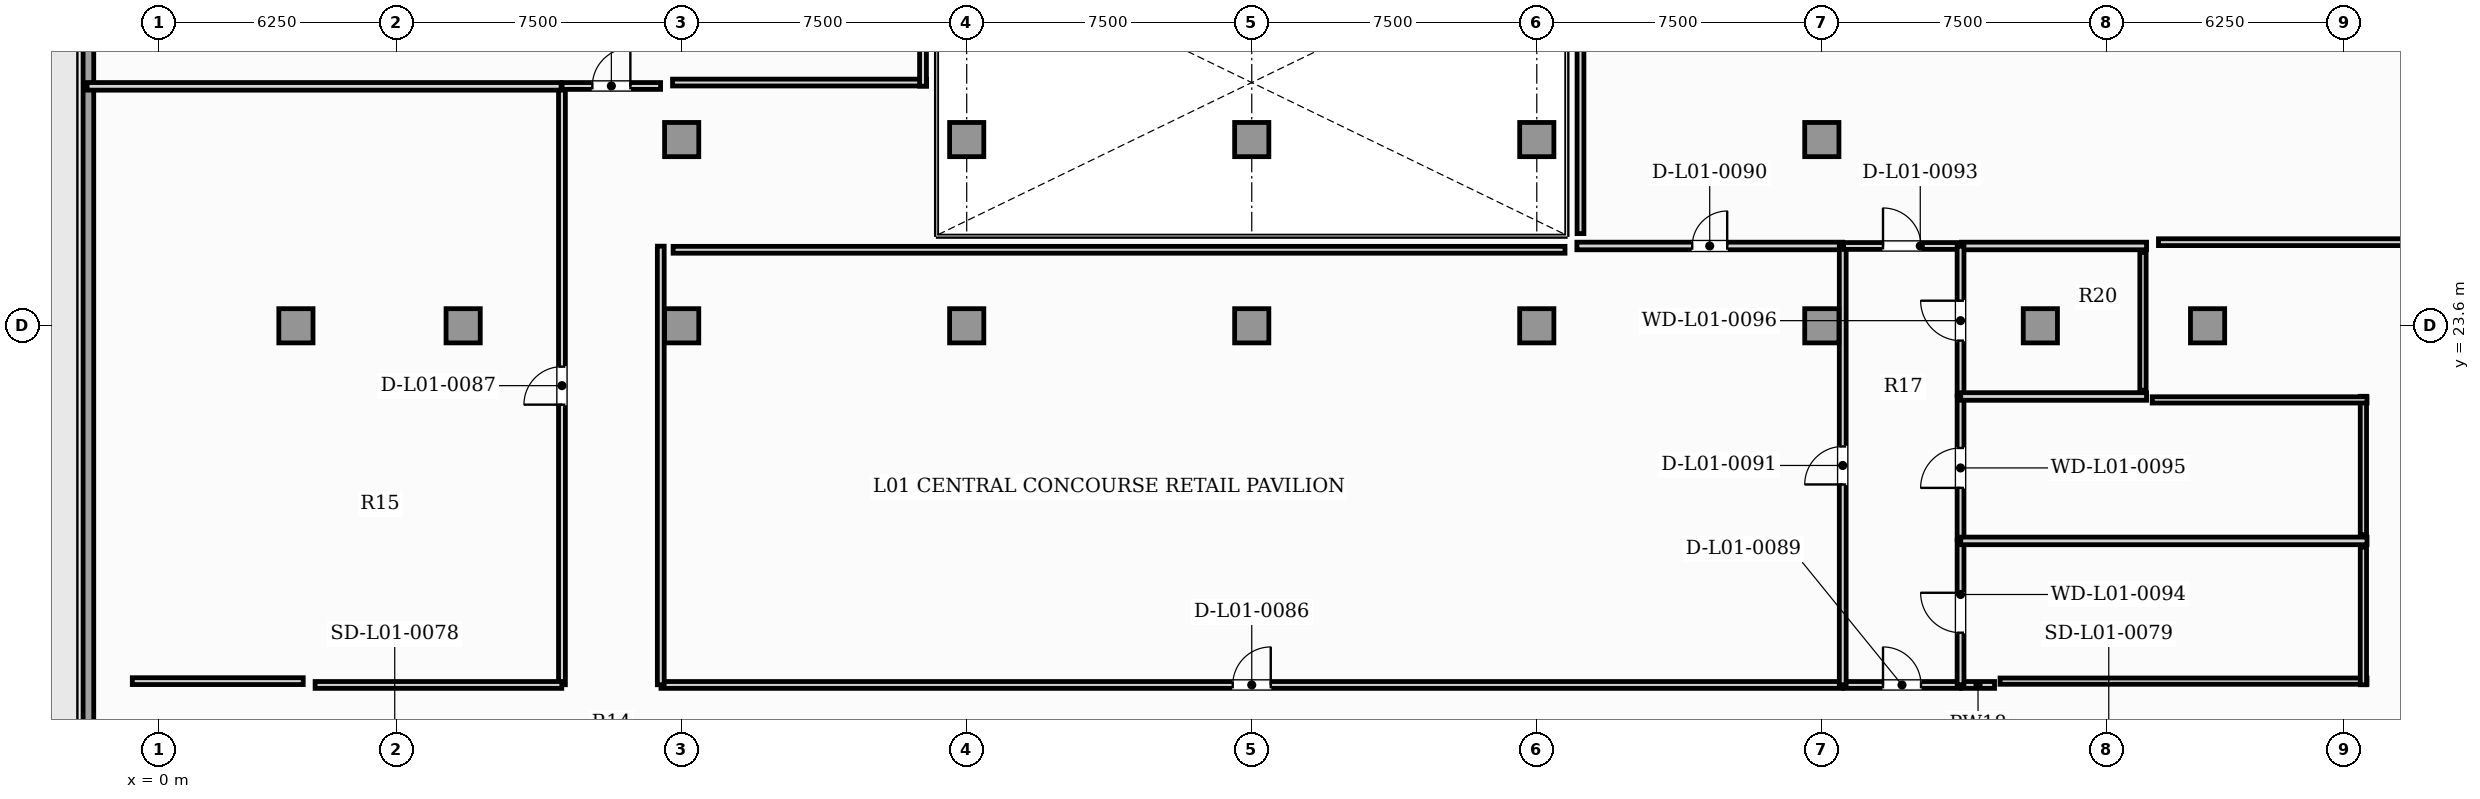
"""IFC4 building model, lengths in metres.
Left out: names, types, materials, properties, quantities, classifications, styles, units other than length and angle.
Written with IfcOpenShell. Run it as: python <this file> out.ifc"""

import sys

from ifc_helpers import new_model, si_unit, direction, frame, frame_2d, origin, origin_2d, place, context, subcontext, project, spatial, rectangle, extrude, element, fill, save


model = new_model("IFC4")
c1 = context("Model", 3, precision=1e-05, world=origin(), true_north=direction((0.0, 1.0)))
c2 = subcontext(c1, "Body", "Model", "MODEL_VIEW")
j1 = project(units=[si_unit("LENGTHUNIT", "METRE"), si_unit("PLANEANGLEUNIT", "RADIAN")], contexts=[c1])
p1 = place(None, origin())
s1 = spatial("IfcSite", under=j1, at=p1, CompositionType="ELEMENT")
p2 = place(p1, origin())
s2 = spatial("IfcBuilding", under=s1, at=p2, CompositionType="ELEMENT")
p3 = place(p2, frame((0.0, 0.0, 5.4)))
s3 = spatial("IfcBuildingStorey", under=s2, at=p3, CompositionType="ELEMENT", Elevation=5.4)
p4 = place(p3, frame((-1.86, 3.88, 0.0), z_axis=(0.0, 0.0, 1.0), x_axis=(0.0, 1.0, 0.0)))
e1 = element("IfcWall", 1, at=p4, inside=s3, PredefinedType="SHEAR", context=c2, shape_type="SweptSolid", body=[
    extrude(rectangle(XDim=34.27, YDim=0.28, at=frame_2d((17.135, 0.0))), origin(), (0.0, 0.0, 1.0), 4.5),
])
for number, where, z_axis, x_axis in (
    (2, (3.6, 23.6, 0.0), (0.0, 0.0, 1.0), (1.0, 0.0, 0.0)),
    (3, (13.75, 23.6, 0.0), (0.0, 0.0, 1.0), (1.0, 0.0, 0.0)),
    (4, (28.75, 23.6, 0.0), (0.0, 0.0, 1.0), (1.0, 0.0, 0.0)),
    (5, (43.75, 23.6, 0.0), (0.0, 0.0, 1.0), (1.0, 0.0, 0.0)),
    (6, (53.9, 23.6, 0.0), (0.0, 0.0, 1.0), (1.0, 0.0, 0.0)),
    (7, (8.0, 23.6, 0.0), (0.0, 0.0, 1.0), (1.0, 0.0, 0.0)),
    (8, (21.25, 23.6, 0.0), (0.0, 0.0, 1.0), (1.0, 0.0, 0.0)),
    (9, (36.25, 23.6, 0.0), (0.0, 0.0, 1.0), (1.0, 0.0, 0.0)),
    (10, (49.5, 23.6, 0.0), (0.0, 0.0, 1.0), (1.0, 0.0, 0.0)),
    (11, (13.75, 28.5, 0.0), (0.0, 0.0, 1.0), (1.0, 0.0, 0.0)),
    (12, (21.25, 28.5, 0.0), (0.0, 0.0, 1.0), (1.0, 0.0, 0.0)),
    (13, (28.75, 28.5, 0.0), (0.0, 0.0, 1.0), (1.0, 0.0, 0.0)),
    (14, (36.25, 28.5, 0.0), (0.0, 0.0, 1.0), (1.0, 0.0, 0.0)),
    (15, (43.75, 28.5, 0.0), (0.0, 0.0, 1.0), (1.0, 0.0, 0.0)),
):
    element("IfcColumn", number, at=place(p3, frame(where, z_axis=z_axis, x_axis=x_axis)), inside=s3, PredefinedType="COLUMN", context=c2, shape_type="SweptSolid", body=[
        extrude(rectangle(XDim=0.9, YDim=0.9, at=origin_2d()), origin(), (0.0, 0.0, 1.0), 4.8),
    ])
p5 = place(p3, frame((13.205, 14.15, 0.0), z_axis=(0.0, 0.0, 1.0), x_axis=(1.0, 0.0, 0.0)))
e16 = element("IfcWall", 16, at=p5, inside=s3, PredefinedType="PARTITIONING", context=c2, shape_type="SweptSolid", body=[
    extrude(rectangle(XDim=31.09, YDim=0.18, at=frame_2d((15.545, 0.0))), origin(), (0.0, 0.0, 1.0), 4.5),
])
p6 = place(p5, frame((15.045, 0.0, 0.0)))
e17 = element("IfcOpeningElement", 17, at=p6, cuts=e16, PredefinedType="OPENING", context=c2, shape_type="SweptSolid", body=[
    extrude(rectangle(XDim=1.0, YDim=2.15, at=frame_2d((0.5, 1.075))), frame((0.0, 0.1, 0.0), z_axis=(0.0, -1.0, 0.0), x_axis=(1.0, 0.0, 0.0)), (0.0, 0.0, 1.0), 0.2),
])
p7 = place(p3, frame((13.2, 14.155, 0.0), z_axis=(0.0, 0.0, 1.0), x_axis=(0.0, 1.0, 0.0)))
e18 = element("IfcWall", 18, at=p7, inside=s3, PredefinedType="PARTITIONING", context=c2, shape_type="SweptSolid", body=[
    extrude(rectangle(XDim=11.54, YDim=0.18, at=frame_2d((5.77, 0.0))), origin(), (0.0, 0.0, 1.0), 4.5),
])
p8 = place(p3, frame((10.6, 14.155, 0.0), z_axis=(0.0, 0.0, 1.0), x_axis=(0.0, 1.0, 0.0)))
e19 = element("IfcWall", 19, at=p8, inside=s3, PredefinedType="PARTITIONING", context=c2, shape_type="SweptSolid", body=[
    extrude(rectangle(XDim=15.74, YDim=0.18, at=frame_2d((7.87, 0.0))), origin(), (0.0, 0.0, 1.0), 4.5),
])
p9 = place(p8, frame((7.37, 0.0, 0.0)))
e20 = element("IfcOpeningElement", 20, at=p9, cuts=e19, PredefinedType="OPENING", context=c2, shape_type="SweptSolid", body=[
    extrude(rectangle(XDim=1.0, YDim=2.15, at=frame_2d((0.5, 1.075))), frame((0.0, 0.1, 0.0), z_axis=(0.0, -1.0, 0.0), x_axis=(1.0, 0.0, 0.0)), (0.0, 0.0, 1.0), 0.2),
])
p10 = place(p3, frame((4.105, 14.15, 0.0), z_axis=(0.0, 0.0, 1.0), x_axis=(1.0, 0.0, 0.0)))
e21 = element("IfcWall", 21, at=p10, inside=s3, PredefinedType="PARTITIONING", context=c2, shape_type="SweptSolid", body=[
    extrude(rectangle(XDim=6.49, YDim=0.18, at=frame_2d((3.245, 0.0))), origin(), (0.0, 0.0, 1.0), 4.5),
])
p11 = place(p3, frame((10.605, 29.91, 0.0), z_axis=(0.0, 0.0, 1.0), x_axis=(1.0, 0.0, 0.0)))
e22 = element("IfcWall", 22, at=p11, inside=s3, PredefinedType="PARTITIONING", context=c2, shape_type="SweptSolid", body=[
    extrude(rectangle(XDim=2.59, YDim=0.18, at=frame_2d((1.295, 0.0))), origin(), (0.0, 0.0, 1.0), 4.5),
])
p12 = place(p11, frame((0.795, 0.0, 0.0)))
e23 = element("IfcOpeningElement", 23, at=p12, cuts=e22, PredefinedType="OPENING", context=c2, shape_type="SweptSolid", body=[
    extrude(rectangle(XDim=1.0, YDim=2.15, at=frame_2d((0.5, 1.075))), frame((0.0, 0.1, 0.0), z_axis=(0.0, -1.0, 0.0), x_axis=(1.0, 0.0, 0.0)), (0.0, 0.0, 1.0), 0.2),
])
p13 = place(p3, frame((44.325, 14.15, 0.0), z_axis=(0.0, 0.0, 1.0), x_axis=(1.0, 0.0, 0.0)))
e24 = element("IfcWall", 24, at=p13, inside=s3, PredefinedType="PARTITIONING", context=c2, shape_type="SweptSolid", body=[
    extrude(rectangle(XDim=3.07, YDim=0.18, at=frame_2d((1.535, 0.0))), origin(), (0.0, 0.0, 1.0), 4.5),
])
p14 = place(p13, frame((1.035, 0.0, 0.0)))
e25 = element("IfcOpeningElement", 25, at=p14, cuts=e24, PredefinedType="OPENING", context=c2, shape_type="SweptSolid", body=[
    extrude(rectangle(XDim=1.0, YDim=2.15, at=frame_2d((0.5, 1.075))), frame((0.0, 0.1, 0.0), z_axis=(0.0, -1.0, 0.0), x_axis=(1.0, 0.0, 0.0)), (0.0, 0.0, 1.0), 0.2),
])
p15 = place(p3, frame((47.425, 14.15, 0.0), z_axis=(0.0, 0.0, 1.0), x_axis=(1.0, 0.0, 0.0)))
e26 = element("IfcWall", 26, at=p15, inside=s3, PredefinedType="PARTITIONING", context=c2, shape_type="SweptSolid", body=[
    extrude(rectangle(XDim=0.87, YDim=0.18, at=frame_2d((0.435, 0.0))), origin(), (0.0, 0.0, 1.0), 4.5),
])
p16 = place(p3, frame((37.305, 25.7, 0.0), z_axis=(0.0, 0.0, 1.0), x_axis=(1.0, 0.0, 0.0)))
e27 = element("IfcWall", 27, at=p16, inside=s3, PredefinedType="PARTITIONING", context=c2, shape_type="SweptSolid", body=[
    extrude(rectangle(XDim=6.99, YDim=0.2, at=frame_2d((3.495, 0.0))), origin(), (0.0, 0.0, 1.0), 4.5),
])
p17 = place(p16, frame((3.035, 0.0, 0.0)))
e28 = element("IfcOpeningElement", 28, at=p17, cuts=e27, PredefinedType="OPENING", context=c2, shape_type="SweptSolid", body=[
    extrude(rectangle(XDim=0.92, YDim=2.1, at=frame_2d((0.46, 1.05))), frame((0.0, 0.11, 0.0), z_axis=(0.0, -1.0, 0.0), x_axis=(1.0, 0.0, 0.0)), (0.0, 0.0, 1.0), 0.22),
])
p18 = place(p3, frame((44.3, 14.155, 0.0), z_axis=(0.0, 0.0, 1.0), x_axis=(0.0, 1.0, 0.0)))
e29 = element("IfcWall", 29, at=p18, inside=s3, PredefinedType="PARTITIONING", context=c2, shape_type="SweptSolid", body=[
    extrude(rectangle(XDim=11.54, YDim=0.18, at=frame_2d((5.77, 0.0))), origin(), (0.0, 0.0, 1.0), 4.5),
])
p19 = place(p18, frame((5.27, 0.0, 0.0)))
e30 = element("IfcOpeningElement", 30, at=p19, cuts=e29, PredefinedType="OPENING", context=c2, shape_type="SweptSolid", body=[
    extrude(rectangle(XDim=1.0, YDim=2.15, at=frame_2d((0.5, 1.075))), frame((0.0, 0.1, 0.0), z_axis=(0.0, -1.0, 0.0), x_axis=(1.0, 0.0, 0.0)), (0.0, 0.0, 1.0), 0.2),
])
p20 = place(p3, frame((-1.895, 29.9, 0.0), z_axis=(0.0, 0.0, 1.0), x_axis=(1.0, 0.0, 0.0)))
e31 = element("IfcWall", 31, at=p20, inside=s3, PredefinedType="PARTITIONING", context=c2, shape_type="SweptSolid", body=[
    extrude(rectangle(XDim=12.472, YDim=0.2, at=frame_2d((6.236, 0.0))), origin(), (0.0, 0.0, 1.0), 4.5),
])
p21 = place(p3, frame((44.325, 25.7, 0.0), z_axis=(0.0, 0.0, 1.0), x_axis=(1.0, 0.0, 0.0)))
e32 = element("IfcWall", 32, at=p21, inside=s3, PredefinedType="PARTITIONING", context=c2, shape_type="SweptSolid", body=[
    extrude(rectangle(XDim=3.07, YDim=0.18, at=frame_2d((1.535, 0.0))), origin(), (0.0, 0.0, 1.0), 4.5),
])
p22 = place(p21, frame((1.035, 0.0, 0.0)))
e33 = element("IfcOpeningElement", 33, at=p22, cuts=e32, PredefinedType="OPENING", context=c2, shape_type="SweptSolid", body=[
    extrude(rectangle(XDim=1.0, YDim=2.15, at=frame_2d((0.5, 1.075))), frame((0.0, 0.1, 0.0), z_axis=(0.0, -1.0, 0.0), x_axis=(1.0, 0.0, 0.0)), (0.0, 0.0, 1.0), 0.2),
])
p23 = place(p3, frame((47.425, 25.7, 0.0), z_axis=(0.0, 0.0, 1.0), x_axis=(1.0, 0.0, 0.0)))
e34 = element("IfcWall", 34, at=p23, inside=s3, PredefinedType="PARTITIONING", context=c2, shape_type="SweptSolid", body=[
    extrude(rectangle(XDim=4.87, YDim=0.2, at=frame_2d((2.435, 0.0))), origin(), (0.0, 0.0, 1.0), 4.5),
])
p24 = place(p3, frame((47.4, 14.155, 0.0), z_axis=(0.0, 0.0, 1.0), x_axis=(0.0, 1.0, 0.0)))
e35 = element("IfcWall", 35, at=p24, inside=s3, PredefinedType="PARTITIONING", context=c2, shape_type="SweptSolid", body=[
    extrude(rectangle(XDim=3.79, YDim=0.18, at=frame_2d((1.895, 0.0))), origin(), (0.0, 0.0, 1.0), 4.5),
])
p25 = place(p24, frame((1.37, 0.0, 0.0)))
e36 = element("IfcOpeningElement", 36, at=p25, cuts=e35, PredefinedType="OPENING", context=c2, shape_type="SweptSolid", body=[
    extrude(rectangle(XDim=1.05, YDim=2.15, at=frame_2d((0.525, 1.075))), frame((0.0, 0.1, 0.0), z_axis=(0.0, -1.0, 0.0), x_axis=(1.0, 0.0, 0.0)), (0.0, 0.0, 1.0), 0.2),
])
p26 = place(p3, frame((47.4, 17.975, 0.0), z_axis=(0.0, 0.0, 1.0), x_axis=(0.0, 1.0, 0.0)))
e37 = element("IfcWall", 37, at=p26, inside=s3, PredefinedType="PARTITIONING", context=c2, shape_type="SweptSolid", body=[
    extrude(rectangle(XDim=3.77, YDim=0.18, at=frame_2d((1.885, 0.0))), origin(), (0.0, 0.0, 1.0), 4.5),
])
p27 = place(p26, frame((1.36, 0.0, 0.0)))
e38 = element("IfcOpeningElement", 38, at=p27, cuts=e37, PredefinedType="OPENING", context=c2, shape_type="SweptSolid", body=[
    extrude(rectangle(XDim=1.05, YDim=2.15, at=frame_2d((0.525, 1.075))), frame((0.0, 0.1, 0.0), z_axis=(0.0, -1.0, 0.0), x_axis=(1.0, 0.0, 0.0)), (0.0, 0.0, 1.0), 0.2),
])
p28 = place(p3, frame((47.4, 21.775, 0.0), z_axis=(0.0, 0.0, 1.0), x_axis=(0.0, 1.0, 0.0)))
e39 = element("IfcWall", 39, at=p28, inside=s3, PredefinedType="PARTITIONING", context=c2, shape_type="SweptSolid", body=[
    extrude(rectangle(XDim=3.92, YDim=0.18, at=frame_2d((1.96, 0.0))), origin(), (0.0, 0.0, 1.0), 4.5),
])
p29 = place(p28, frame((1.435, 0.0, 0.0)))
e40 = element("IfcOpeningElement", 40, at=p29, cuts=e39, PredefinedType="OPENING", context=c2, shape_type="SweptSolid", body=[
    extrude(rectangle(XDim=1.05, YDim=2.15, at=frame_2d((0.525, 1.075))), frame((0.0, 0.1, 0.0), z_axis=(0.0, -1.0, 0.0), x_axis=(1.0, 0.0, 0.0)), (0.0, 0.0, 1.0), 0.2),
])
p30 = place(p3, frame((47.405, 17.94, 0.0), z_axis=(0.0, 0.0, 1.0), x_axis=(1.0, 0.0, 0.0)))
e41 = element("IfcWall", 41, at=p30, inside=s3, PredefinedType="PARTITIONING", context=c2, shape_type="SweptSolid", body=[
    extrude(rectangle(XDim=10.69, YDim=0.2, at=frame_2d((5.345, 0.0))), origin(), (0.0, 0.0, 1.0), 4.5),
])
p31 = place(p3, frame((47.405, 21.74, 0.0), z_axis=(0.0, 0.0, 1.0), x_axis=(1.0, 0.0, 0.0)))
e42 = element("IfcWall", 42, at=p31, inside=s3, PredefinedType="PARTITIONING", context=c2, shape_type="SweptSolid", body=[
    extrude(rectangle(XDim=4.89, YDim=0.2, at=frame_2d((2.445, 0.0))), origin(), (0.0, 0.0, 1.0), 4.5),
])
p32 = place(p3, frame((36.993, 25.6, 0.0), z_axis=(0.0, 0.0, 1.0), x_axis=(-1.0, 0.0, 0.0)))
e43 = element("IfcWall", 43, at=p32, inside=s3, PredefinedType="PARTITIONING", context=c2, shape_type="SweptSolid", body=[
    extrude(rectangle(XDim=23.468, YDim=0.18, at=frame_2d((11.734, 0.0))), origin(), (0.0, 0.0, 1.0), 4.5),
])
p33 = place(p3, frame((-0.705, 14.25, 0.0), z_axis=(0.0, 0.0, 1.0), x_axis=(1.0, 0.0, 0.0)))
e44 = element("IfcWall", 44, at=p33, inside=s3, PredefinedType="PARTITIONING", context=c2, shape_type="SweptSolid", body=[
    extrude(rectangle(XDim=4.498, YDim=0.18, at=frame_2d((2.249, 0.0))), origin(), (0.0, 0.0, 1.0), 4.5),
])
p34 = place(p3, frame((13.51, 30.0, 0.0), z_axis=(0.0, 0.0, 1.0), x_axis=(1.0, 0.0, 0.0)))
e45 = element("IfcWall", 45, at=p34, inside=s3, PredefinedType="PARTITIONING", context=c2, shape_type="SweptSolid", body=[
    extrude(rectangle(XDim=6.685, YDim=0.18, at=frame_2d((3.343, 0.0))), origin(), (0.0, 0.0, 1.0), 4.5),
])
p35 = place(p3, frame((20.1, 29.905, 0.0), z_axis=(0.0, 0.0, 1.0), x_axis=(0.0, 1.0, 0.0)))
e46 = element("IfcWall", 46, at=p35, inside=s3, PredefinedType="PARTITIONING", context=c2, shape_type="SweptSolid", body=[
    extrude(rectangle(XDim=4.088, YDim=0.18, at=frame_2d((2.044, 0.0))), origin(), (0.0, 0.0, 1.0), 4.5),
])
p36 = place(p3, frame((52.607, 25.8, 0.0), z_axis=(0.0, 0.0, 1.0), x_axis=(1.0, 0.0, 0.0)))
e47 = element("IfcWall", 47, at=p36, inside=s3, PredefinedType="PARTITIONING", context=c2, shape_type="SweptSolid", body=[
    extrude(rectangle(XDim=9.988, YDim=0.18, at=frame_2d((4.994, 0.0))), origin(), (0.0, 0.0, 1.0), 4.5),
])
p37 = place(p3, frame((37.4, 33.993, 0.0), z_axis=(0.0, 0.0, 1.0), x_axis=(0.0, -1.0, 0.0)))
e48 = element("IfcWall", 48, at=p37, inside=s3, PredefinedType="PARTITIONING", context=c2, shape_type="SweptSolid", body=[
    extrude(rectangle(XDim=7.968, YDim=0.18, at=frame_2d((3.984, 0.0))), origin(), (0.0, 0.0, 1.0), 4.5),
])
p38 = place(p3, frame((48.44, 14.25, 0.0), z_axis=(0.0, 0.0, 1.0), x_axis=(1.0, 0.0, 0.0)))
e49 = element("IfcWall", 49, at=p38, inside=s3, PredefinedType="PLUMBINGWALL", context=c2, shape_type="SweptSolid", body=[
    extrude(rectangle(XDim=9.655, YDim=0.165, at=frame_2d((4.828, 0.0))), origin(), (0.0, 0.0, 1.0), 4.5),
])
p39 = place(p3, frame((58.0, 14.155, 0.0), z_axis=(0.0, 0.0, 1.0), x_axis=(0.0, 1.0, 0.0)))
e50 = element("IfcWall", 50, at=p39, inside=s3, PredefinedType="PLUMBINGWALL", context=c2, shape_type="SweptSolid", body=[
    extrude(rectangle(XDim=3.62, YDim=0.165, at=frame_2d((1.81, 0.0))), origin(), (0.0, 0.0, 1.0), 4.5),
])
p40 = place(p3, frame((58.0, 18.105, 0.0), z_axis=(0.0, 0.0, 1.0), x_axis=(0.0, 1.0, 0.0)))
e51 = element("IfcWall", 51, at=p40, inside=s3, PredefinedType="PLUMBINGWALL", context=c2, shape_type="SweptSolid", body=[
    extrude(rectangle(XDim=3.64, YDim=0.165, at=frame_2d((1.82, 0.0))), origin(), (0.0, 0.0, 1.0), 4.5),
])
p41 = place(p3, frame((58.095, 21.65, 0.0), z_axis=(0.0, 0.0, 1.0), x_axis=(-1.0, 0.0, 0.0)))
e52 = element("IfcWall", 52, at=p41, inside=s3, PredefinedType="PLUMBINGWALL", context=c2, shape_type="SweptSolid", body=[
    extrude(rectangle(XDim=5.651, YDim=0.165, at=frame_2d((2.826, 0.0))), origin(), (0.0, 0.0, 1.0), 4.5),
])
p42 = place(p3, frame((52.2, 21.905, 0.0), z_axis=(0.0, 0.0, 1.0), x_axis=(0.0, 1.0, 0.0)))
e53 = element("IfcWall", 53, at=p42, inside=s3, PredefinedType="PLUMBINGWALL", context=c2, shape_type="SweptSolid", body=[
    extrude(rectangle(XDim=3.63, YDim=0.165, at=frame_2d((1.815, 0.0))), origin(), (0.0, 0.0, 1.0), 4.5),
])
p43 = place(p6, origin())
e54 = element("IfcDoor", 54, at=p43, inside=s3, OperationType="SINGLE_SWING_RIGHT", PredefinedType="DOOR", context=c2, shape_type="SweptSolid", body=[
    extrude(rectangle(XDim=1.0, YDim=2.15, at=frame_2d((0.5, 1.075))), frame((0.0, 0.025, 0.0), z_axis=(0.0, -1.0, 0.0), x_axis=(1.0, 0.0, 0.0)), (0.0, 0.0, 1.0), 0.05),
])
fill(e17, e54)
p44 = place(p9, origin())
e55 = element("IfcDoor", 55, at=p44, inside=s3, OperationType="SINGLE_SWING_LEFT", PredefinedType="DOOR", context=c2, shape_type="SweptSolid", body=[
    extrude(rectangle(XDim=1.0, YDim=2.15, at=frame_2d((0.5, 1.075))), frame((0.0, 0.025, 0.0), z_axis=(0.0, -1.0, 0.0), x_axis=(1.0, 0.0, 0.0)), (0.0, 0.0, 1.0), 0.05),
])
fill(e20, e55)
p45 = place(p12, origin())
e56 = element("IfcDoor", 56, at=p45, inside=s3, OperationType="SINGLE_SWING_RIGHT", PredefinedType="DOOR", context=c2, shape_type="SweptSolid", body=[
    extrude(rectangle(XDim=1.0, YDim=2.15, at=frame_2d((0.5, 1.075))), frame((0.0, 0.025, 0.0), z_axis=(0.0, -1.0, 0.0), x_axis=(1.0, 0.0, 0.0)), (0.0, 0.0, 1.0), 0.05),
])
fill(e23, e56)
p46 = place(p14, origin())
e57 = element("IfcDoor", 57, at=p46, inside=s3, OperationType="SINGLE_SWING_LEFT", PredefinedType="DOOR", context=c2, shape_type="SweptSolid", body=[
    extrude(rectangle(XDim=1.0, YDim=2.15, at=frame_2d((0.5, 1.075))), frame((0.0, 0.025, 0.0), z_axis=(0.0, -1.0, 0.0), x_axis=(1.0, 0.0, 0.0)), (0.0, 0.0, 1.0), 0.05),
])
fill(e25, e57)
p47 = place(p17, origin())
e58 = element("IfcDoor", 58, at=p47, inside=s3, OperationType="SINGLE_SWING_RIGHT", PredefinedType="DOOR", context=c2, shape_type="SweptSolid", body=[
    extrude(rectangle(XDim=0.92, YDim=2.1, at=frame_2d((0.46, 1.05))), frame((0.0, 0.025, 0.0), z_axis=(0.0, -1.0, 0.0), x_axis=(1.0, 0.0, 0.0)), (0.0, 0.0, 1.0), 0.05),
])
fill(e28, e58)
p48 = place(p19, origin())
e59 = element("IfcDoor", 59, at=p48, inside=s3, OperationType="SINGLE_SWING_LEFT", PredefinedType="DOOR", context=c2, shape_type="SweptSolid", body=[
    extrude(rectangle(XDim=1.0, YDim=2.15, at=frame_2d((0.5, 1.075))), frame((0.0, 0.025, 0.0), z_axis=(0.0, -1.0, 0.0), x_axis=(1.0, 0.0, 0.0)), (0.0, 0.0, 1.0), 0.05),
])
fill(e30, e59)
p49 = place(p22, origin())
e60 = element("IfcDoor", 60, at=p49, inside=s3, OperationType="SINGLE_SWING_LEFT", PredefinedType="DOOR", context=c2, shape_type="SweptSolid", body=[
    extrude(rectangle(XDim=1.0, YDim=2.15, at=frame_2d((0.5, 1.075))), frame((0.0, 0.025, 0.0), z_axis=(0.0, -1.0, 0.0), x_axis=(1.0, 0.0, 0.0)), (0.0, 0.0, 1.0), 0.05),
])
fill(e33, e60)
p50 = place(p25, origin())
e61 = element("IfcDoor", 61, at=p50, inside=s3, OperationType="SINGLE_SWING_RIGHT", PredefinedType="DOOR", context=c2, shape_type="SweptSolid", body=[
    extrude(rectangle(XDim=1.05, YDim=2.15, at=frame_2d((0.525, 1.075))), frame((0.0, 0.025, 0.0), z_axis=(0.0, -1.0, 0.0), x_axis=(1.0, 0.0, 0.0)), (0.0, 0.0, 1.0), 0.05),
])
fill(e36, e61)
p51 = place(p27, origin())
e62 = element("IfcDoor", 62, at=p51, inside=s3, OperationType="SINGLE_SWING_LEFT", PredefinedType="DOOR", context=c2, shape_type="SweptSolid", body=[
    extrude(rectangle(XDim=1.05, YDim=2.15, at=frame_2d((0.525, 1.075))), frame((0.0, 0.025, 0.0), z_axis=(0.0, -1.0, 0.0), x_axis=(1.0, 0.0, 0.0)), (0.0, 0.0, 1.0), 0.05),
])
fill(e38, e62)
p52 = place(p29, origin())
e63 = element("IfcDoor", 63, at=p52, inside=s3, OperationType="SINGLE_SWING_RIGHT", PredefinedType="DOOR", context=c2, shape_type="SweptSolid", body=[
    extrude(rectangle(XDim=1.05, YDim=2.15, at=frame_2d((0.525, 1.075))), frame((0.0, 0.025, 0.0), z_axis=(0.0, -1.0, 0.0), x_axis=(1.0, 0.0, 0.0)), (0.0, 0.0, 1.0), 0.05),
])
fill(e40, e63)
save(model, sys.argv[1])
